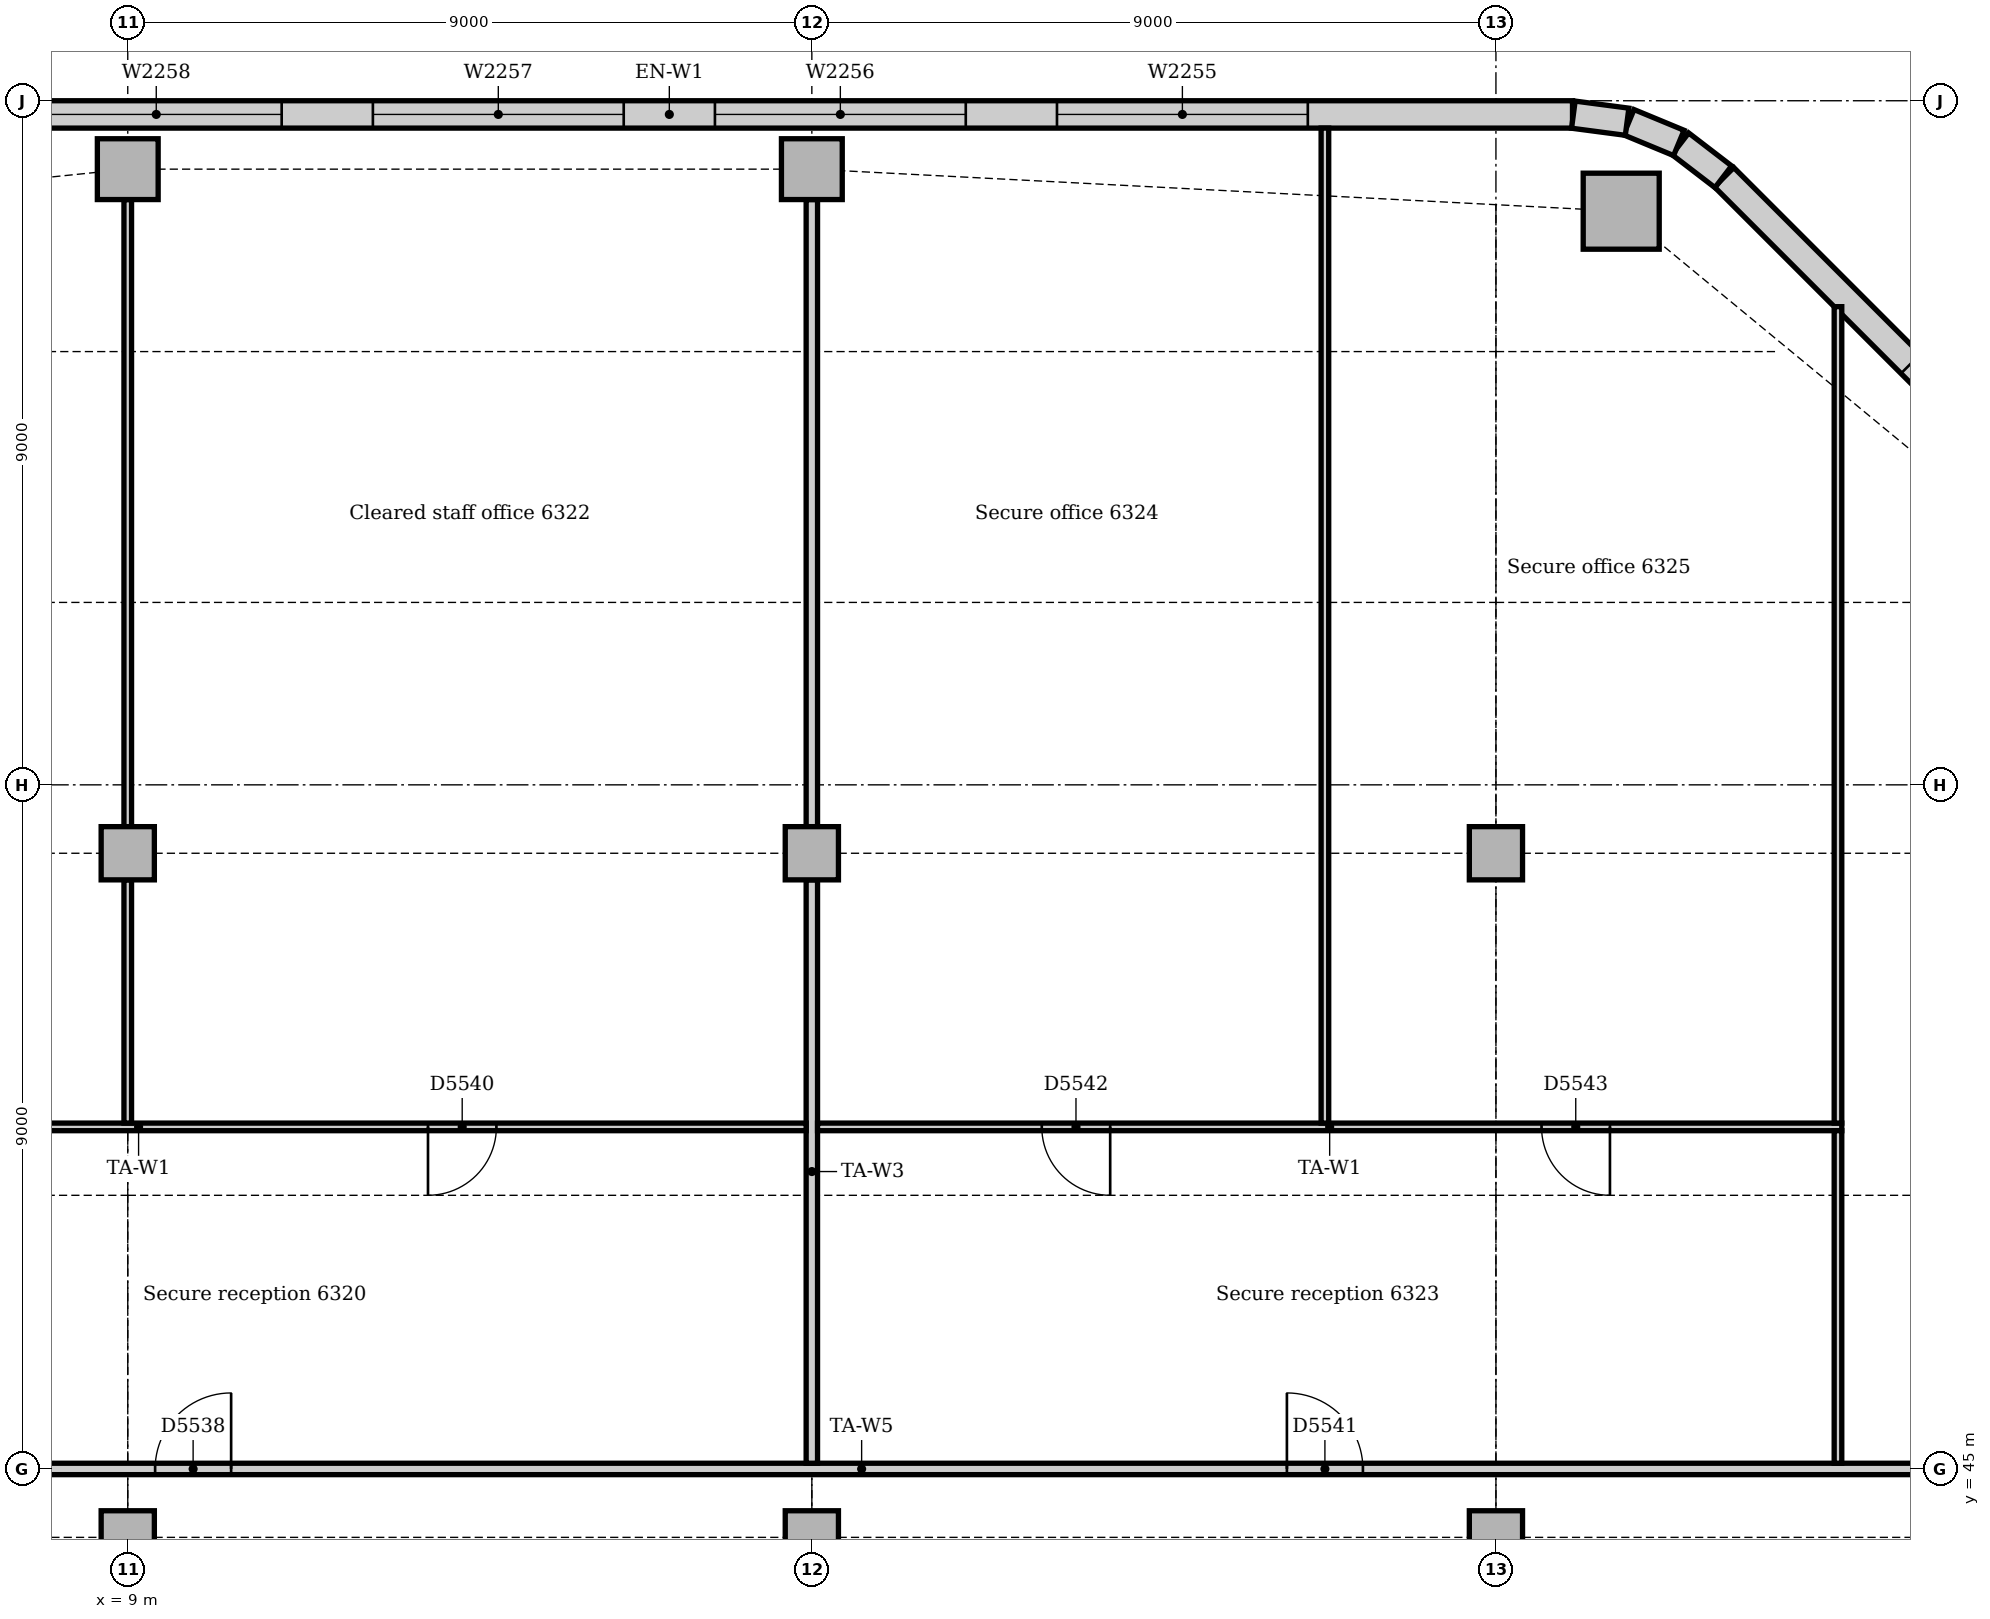
"""IFC4 building model, lengths in metres.
Left out: names, types, materials, properties, quantities, classifications, styles, units other than length and angle.
Written with IfcOpenShell. Run it as: python <this file> out.ifc"""

import sys

from ifc_helpers import new_model, si_unit, direction, frame, frame_2d, origin, origin_2d, place, context, subcontext, project, spatial, rectangle, extrude, element, fill, save


model = new_model("IFC4")
c1 = context("Model", 3, precision=1e-05, world=origin(), true_north=direction((0.0, 1.0)))
c2 = subcontext(c1, "Body", "Model", "MODEL_VIEW")
j1 = project(units=[si_unit("LENGTHUNIT", "METRE"), si_unit("PLANEANGLEUNIT", "RADIAN")], contexts=[c1])
p1 = place(None, origin())
s1 = spatial("IfcSite", under=j1, at=p1, CompositionType="ELEMENT")
p2 = place(p1, origin())
s2 = spatial("IfcBuilding", under=s1, at=p2, CompositionType="ELEMENT")
p3 = place(p2, frame((0.0, 0.0, 263.0)))
s3 = spatial("IfcBuildingStorey", under=s2, at=p3, CompositionType="ELEMENT", Elevation=263.0)
p4 = place(p3, frame((28.648, 61.547, 0.0), z_axis=(0.0, 0.0, 1.0), x_axis=(1.0, 0.0, 0.0)))
e1 = element("IfcColumn", 1, at=p4, inside=s3, PredefinedType="COLUMN", context=c2, shape_type="SweptSolid", body=[
    extrude(rectangle(XDim=1.0, YDim=1.0, at=origin_2d()), origin(), (0.0, 0.0, 1.0), 3.85),
])
for number, where, z_axis, x_axis in (
    (2, (9.0, 62.1, 0.0), (0.0, 0.0, 1.0), (1.0, 0.0, 0.0)),
    (3, (18.0, 62.1, 0.0), (0.0, 0.0, 1.0), (1.0, 0.0, 0.0)),
):
    element("IfcColumn", number, at=place(p3, frame(where, z_axis=z_axis, x_axis=x_axis)), inside=s3, PredefinedType="COLUMN", context=c2, shape_type="SweptSolid", body=[
        extrude(rectangle(XDim=0.8, YDim=0.8, at=origin_2d()), origin(), (0.0, 0.0, 1.0), 3.85),
    ])
for number, where, z_axis, x_axis in (
    (4, (9.0, 44.1, 0.0), (0.0, 0.0, 1.0), (1.0, 0.0, 0.0)),
    (5, (9.0, 53.1, 0.0), (0.0, 0.0, 1.0), (1.0, 0.0, 0.0)),
    (6, (18.0, 44.1, 0.0), (0.0, 0.0, 1.0), (1.0, 0.0, 0.0)),
    (7, (18.0, 53.1, 0.0), (0.0, 0.0, 1.0), (1.0, 0.0, 0.0)),
    (8, (27.0, 44.1, 0.0), (0.0, 0.0, 1.0), (1.0, 0.0, 0.0)),
    (9, (27.0, 53.1, 0.0), (0.0, 0.0, 1.0), (1.0, 0.0, 0.0)),
):
    element("IfcColumn", number, at=place(p3, frame(where, z_axis=z_axis, x_axis=x_axis)), inside=s3, PredefinedType="COLUMN", context=c2, shape_type="SweptSolid", body=[
        extrude(rectangle(XDim=0.7, YDim=0.7, at=origin_2d()), origin(), (0.0, 0.0, 1.0), 3.85),
    ])
p5 = place(p3, frame((37.244, 54.751, 0.0), z_axis=(0.0, 0.0, 1.0), x_axis=(-0.707106781187, 0.707106781187, 0.0)))
e10 = element("IfcWall", 10, at=p5, inside=s3, PredefinedType="STANDARD", context=c2, shape_type="SweptSolid", body=[
    extrude(rectangle(XDim=10.243, YDim=0.36, at=frame_2d((5.121, 0.0))), origin(), (0.0, 0.0, 1.0), 3.85),
])
p6 = place(p5, frame((3.471, 0.0, 0.9)))
e11 = element("IfcOpeningElement", 11, at=p6, cuts=e10, PredefinedType="OPENING", context=c2, shape_type="SweptSolid", body=[
    extrude(rectangle(XDim=3.3, YDim=1.6, at=frame_2d((1.65, 0.8))), frame((0.0, 0.19, 0.0), z_axis=(0.0, -1.0, 0.0), x_axis=(1.0, 0.0, 0.0)), (0.0, 0.0, 1.0), 0.38),
])
p7 = place(p3, frame((28.007, 62.82, 0.0), z_axis=(0.0, 0.0, 1.0), x_axis=(-1.0, 0.0, 0.0)))
e12 = element("IfcWall", 12, at=p7, inside=s3, PredefinedType="STANDARD", context=c2, shape_type="SweptSolid", body=[
    extrude(rectangle(XDim=23.765, YDim=0.36, at=frame_2d((11.882, 0.0))), origin(), (0.0, 0.0, 1.0), 3.85),
])
p8 = place(p7, frame((3.482, 0.0, 0.9)))
e13 = element("IfcOpeningElement", 13, at=p8, cuts=e12, PredefinedType="OPENING", context=c2, shape_type="SweptSolid", body=[
    extrude(rectangle(XDim=3.3, YDim=1.6, at=frame_2d((1.65, 0.8))), frame((0.0, 0.19, 0.0), z_axis=(0.0, -1.0, 0.0), x_axis=(1.0, 0.0, 0.0)), (0.0, 0.0, 1.0), 0.38),
])
p9 = place(p7, frame((7.982, 0.0, 0.9)))
e14 = element("IfcOpeningElement", 14, at=p9, cuts=e12, PredefinedType="OPENING", context=c2, shape_type="SweptSolid", body=[
    extrude(rectangle(XDim=3.3, YDim=1.6, at=frame_2d((1.65, 0.8))), frame((0.0, 0.19, 0.0), z_axis=(0.0, -1.0, 0.0), x_axis=(1.0, 0.0, 0.0)), (0.0, 0.0, 1.0), 0.38),
])
p10 = place(p7, frame((12.482, 0.0, 0.9)))
e15 = element("IfcOpeningElement", 15, at=p10, cuts=e12, PredefinedType="OPENING", context=c2, shape_type="SweptSolid", body=[
    extrude(rectangle(XDim=3.3, YDim=1.6, at=frame_2d((1.65, 0.8))), frame((0.0, 0.19, 0.0), z_axis=(0.0, -1.0, 0.0), x_axis=(1.0, 0.0, 0.0)), (0.0, 0.0, 1.0), 0.38),
])
p11 = place(p7, frame((16.982, 0.0, 0.9)))
e16 = element("IfcOpeningElement", 16, at=p11, cuts=e12, PredefinedType="OPENING", context=c2, shape_type="SweptSolid", body=[
    extrude(rectangle(XDim=3.3, YDim=1.6, at=frame_2d((1.65, 0.8))), frame((0.0, 0.19, 0.0), z_axis=(0.0, -1.0, 0.0), x_axis=(1.0, 0.0, 0.0)), (0.0, 0.0, 1.0), 0.38),
])
p12 = place(p3, frame((29.991, 62.0, 0.0), z_axis=(0.0, 0.0, 1.0), x_axis=(-0.793321924995, 0.608802368033, 0.0)))
e17 = element("IfcWall", 17, at=p12, inside=s3, PredefinedType="STANDARD", context=c2, shape_type="SweptSolid", body=[
    extrude(rectangle(XDim=0.713, YDim=0.36, at=frame_2d((0.357, 0.0))), origin(), (0.0, 0.0, 1.0), 3.85),
])
for number, where, z_axis, x_axis in (
    (18, (29.406, 62.445, 0.0), (0.0, 0.0, 1.0), (-0.924, 0.383, 0.0)),
    (19, (28.726, 62.724, 0.0), (0.0, 0.0, 1.0), (-0.991, 0.131, 0.0)),
):
    element("IfcWall", number, at=place(p3, frame(where, z_axis=z_axis, x_axis=x_axis)), inside=s3, PredefinedType="STANDARD", context=c2, shape_type="SweptSolid", body=[
        extrude(rectangle(XDim=0.713, YDim=0.36, at=frame_2d((0.356, 0.0))), origin(), (0.0, 0.0, 1.0), 3.85),
    ])
p13 = place(p3, frame((0.36, 45.0, 0.0), z_axis=(0.0, 0.0, 1.0), x_axis=(1.0, 0.0, 0.0)))
e20 = element("IfcWall", 20, at=p13, inside=s3, PredefinedType="PARTITIONING", context=c2, shape_type="SweptSolid", body=[
    extrude(rectangle(XDim=36.59, YDim=0.15, at=frame_2d((18.295, 0.0))), origin(), (0.0, 0.0, 1.0), 3.85),
])
p14 = place(p13, frame((9.0, 0.0, 0.0)))
e21 = element("IfcOpeningElement", 21, at=p14, cuts=e20, PredefinedType="OPENING", context=c2, shape_type="SweptSolid", body=[
    extrude(rectangle(XDim=1.0, YDim=2.1, at=frame_2d((0.5, 1.05))), frame((0.0, 0.085, 0.0), z_axis=(0.0, -1.0, 0.0), x_axis=(1.0, 0.0, 0.0)), (0.0, 0.0, 1.0), 0.17),
])
p15 = place(p13, frame((23.89, 0.0, 0.0)))
e22 = element("IfcOpeningElement", 22, at=p15, cuts=e20, PredefinedType="OPENING", context=c2, shape_type="SweptSolid", body=[
    extrude(rectangle(XDim=1.0, YDim=2.1, at=frame_2d((0.5, 1.05))), frame((0.0, 0.085, 0.0), z_axis=(0.0, -1.0, 0.0), x_axis=(1.0, 0.0, 0.0)), (0.0, 0.0, 1.0), 0.17),
])
p16 = place(p13, frame((33.34, 0.0, 0.0)))
e23 = element("IfcOpeningElement", 23, at=p16, cuts=e20, PredefinedType="OPENING", context=c2, shape_type="SweptSolid", body=[
    extrude(rectangle(XDim=0.9, YDim=2.1, at=frame_2d((0.45, 1.05))), frame((0.0, 0.085, 0.0), z_axis=(0.0, -1.0, 0.0), x_axis=(1.0, 0.0, 0.0)), (0.0, 0.0, 1.0), 0.17),
])
p17 = place(p3, frame((18.0, 45.075, 0.0), z_axis=(0.0, 0.0, 1.0), x_axis=(0.0, 1.0, 0.0)))
e24 = element("IfcWall", 24, at=p17, inside=s3, PredefinedType="PARTITIONING", context=c2, shape_type="SweptSolid", body=[
    extrude(rectangle(XDim=7.675, YDim=0.15, at=frame_2d((3.837, 0.0))), origin(), (0.0, 0.0, 1.0), 3.4),
])
p18 = place(p3, frame((18.0, 53.45, 0.0), z_axis=(0.0, 0.0, 1.0), x_axis=(0.0, 1.0, 0.0)))
e25 = element("IfcWall", 25, at=p18, inside=s3, PredefinedType="PARTITIONING", context=c2, shape_type="SweptSolid", body=[
    extrude(rectangle(XDim=8.25, YDim=0.15, at=frame_2d((4.125, 0.0))), origin(), (0.0, 0.0, 1.0), 3.4),
])
p19 = place(p3, frame((18.075, 49.5, 0.0), z_axis=(0.0, 0.0, 1.0), x_axis=(1.0, 0.0, 0.0)))
e26 = element("IfcWall", 26, at=p19, inside=s3, PredefinedType="PARTITIONING", context=c2, shape_type="SweptSolid", body=[
    extrude(rectangle(XDim=13.475, YDim=0.1, at=frame_2d((6.737, 0.0))), origin(), (0.0, 0.0, 1.0), 3.85),
])
p20 = place(p19, frame((2.95, 0.0, 0.0)))
e27 = element("IfcOpeningElement", 27, at=p20, cuts=e26, PredefinedType="OPENING", context=c2, shape_type="SweptSolid", body=[
    extrude(rectangle(XDim=0.9, YDim=2.1, at=frame_2d((0.45, 1.05))), frame((0.0, 0.06, 0.0), z_axis=(0.0, -1.0, 0.0), x_axis=(1.0, 0.0, 0.0)), (0.0, 0.0, 1.0), 0.12),
])
p21 = place(p19, frame((9.525, 0.0, 0.0)))
e28 = element("IfcOpeningElement", 28, at=p21, cuts=e26, PredefinedType="OPENING", context=c2, shape_type="SweptSolid", body=[
    extrude(rectangle(XDim=0.9, YDim=2.1, at=frame_2d((0.45, 1.05))), frame((0.0, 0.06, 0.0), z_axis=(0.0, -1.0, 0.0), x_axis=(1.0, 0.0, 0.0)), (0.0, 0.0, 1.0), 0.12),
])
p22 = place(p3, frame((0.36, 49.5, 0.0), z_axis=(0.0, 0.0, 1.0), x_axis=(1.0, 0.0, 0.0)))
e29 = element("IfcWall", 29, at=p22, inside=s3, PredefinedType="PARTITIONING", context=c2, shape_type="SweptSolid", body=[
    extrude(rectangle(XDim=17.565, YDim=0.1, at=frame_2d((8.783, 0.0))), origin(), (0.0, 0.0, 1.0), 3.85),
])
p23 = place(p22, frame((3.95, 0.0, 0.0)))
e30 = element("IfcOpeningElement", 30, at=p23, cuts=e29, PredefinedType="OPENING", context=c2, shape_type="SweptSolid", body=[
    extrude(rectangle(XDim=0.9, YDim=2.1, at=frame_2d((0.45, 1.05))), frame((0.0, 0.06, 0.0), z_axis=(0.0, -1.0, 0.0), x_axis=(1.0, 0.0, 0.0)), (0.0, 0.0, 1.0), 0.12),
])
p24 = place(p22, frame((12.59, 0.0, 0.0)))
e31 = element("IfcOpeningElement", 31, at=p24, cuts=e29, PredefinedType="OPENING", context=c2, shape_type="SweptSolid", body=[
    extrude(rectangle(XDim=0.9, YDim=2.1, at=frame_2d((0.45, 1.05))), frame((0.0, 0.06, 0.0), z_axis=(0.0, -1.0, 0.0), x_axis=(1.0, 0.0, 0.0)), (0.0, 0.0, 1.0), 0.12),
])
p25 = place(p3, frame((31.5, 45.075, 0.0), z_axis=(0.0, 0.0, 1.0), x_axis=(0.0, 1.0, 0.0)))
e32 = element("IfcWall", 32, at=p25, inside=s3, PredefinedType="PARTITIONING", context=c2, shape_type="SweptSolid", body=[
    extrude(rectangle(XDim=4.375, YDim=0.1, at=frame_2d((2.188, 0.0))), origin(), (0.0, 0.0, 1.0), 3.85),
])
p26 = place(p3, frame((31.5, 49.55, 0.0), z_axis=(0.0, 0.0, 1.0), x_axis=(0.0, 1.0, 0.0)))
e33 = element("IfcWall", 33, at=p26, inside=s3, PredefinedType="PARTITIONING", context=c2, shape_type="SweptSolid", body=[
    extrude(rectangle(XDim=10.741, YDim=0.1, at=frame_2d((5.37, 0.0))), origin(), (0.0, 0.0, 1.0), 3.85),
])
p27 = place(p3, frame((9.0, 49.55, 0.0), z_axis=(0.0, 0.0, 1.0), x_axis=(0.0, 1.0, 0.0)))
e34 = element("IfcWall", 34, at=p27, inside=s3, PredefinedType="PARTITIONING", context=c2, shape_type="SweptSolid", body=[
    extrude(rectangle(XDim=3.2, YDim=0.1, at=frame_2d((1.6, 0.0))), origin(), (0.0, 0.0, 1.0), 3.4),
])
p28 = place(p3, frame((9.0, 53.45, 0.0), z_axis=(0.0, 0.0, 1.0), x_axis=(0.0, 1.0, 0.0)))
e35 = element("IfcWall", 35, at=p28, inside=s3, PredefinedType="PARTITIONING", context=c2, shape_type="SweptSolid", body=[
    extrude(rectangle(XDim=8.25, YDim=0.1, at=frame_2d((4.125, 0.0))), origin(), (0.0, 0.0, 1.0), 3.4),
])
p29 = place(p3, frame((24.75, 49.55, 0.0), z_axis=(0.0, 0.0, 1.0), x_axis=(0.0, 1.0, 0.0)))
e36 = element("IfcWall", 36, at=p29, inside=s3, PredefinedType="PARTITIONING", context=c2, shape_type="SweptSolid", body=[
    extrude(rectangle(XDim=13.09, YDim=0.1, at=frame_2d((6.545, 0.0))), origin(), (0.0, 0.0, 1.0), 3.85),
])
p30 = place(p6, origin())
e37 = element("IfcWindow", 37, at=p30, inside=s3, PartitioningType="SINGLE_PANEL", PredefinedType="WINDOW", context=c2, shape_type="SweptSolid", body=[
    extrude(rectangle(XDim=3.3, YDim=1.6, at=frame_2d((1.65, 0.8))), frame((0.0, 0.13, 0.0), z_axis=(0.0, -1.0, 0.0), x_axis=(1.0, 0.0, 0.0)), (0.0, 0.0, 1.0), 0.06),
])
fill(e11, e37)
p31 = place(p8, origin())
e38 = element("IfcWindow", 38, at=p31, inside=s3, PartitioningType="SINGLE_PANEL", PredefinedType="WINDOW", context=c2, shape_type="SweptSolid", body=[
    extrude(rectangle(XDim=3.3, YDim=1.6, at=frame_2d((1.65, 0.8))), frame((0.0, 0.13, 0.0), z_axis=(0.0, -1.0, 0.0), x_axis=(1.0, 0.0, 0.0)), (0.0, 0.0, 1.0), 0.06),
])
fill(e13, e38)
p32 = place(p9, origin())
e39 = element("IfcWindow", 39, at=p32, inside=s3, PartitioningType="SINGLE_PANEL", PredefinedType="WINDOW", context=c2, shape_type="SweptSolid", body=[
    extrude(rectangle(XDim=3.3, YDim=1.6, at=frame_2d((1.65, 0.8))), frame((0.0, 0.13, 0.0), z_axis=(0.0, -1.0, 0.0), x_axis=(1.0, 0.0, 0.0)), (0.0, 0.0, 1.0), 0.06),
])
fill(e14, e39)
p33 = place(p10, origin())
e40 = element("IfcWindow", 40, at=p33, inside=s3, PartitioningType="SINGLE_PANEL", PredefinedType="WINDOW", context=c2, shape_type="SweptSolid", body=[
    extrude(rectangle(XDim=3.3, YDim=1.6, at=frame_2d((1.65, 0.8))), frame((0.0, 0.13, 0.0), z_axis=(0.0, -1.0, 0.0), x_axis=(1.0, 0.0, 0.0)), (0.0, 0.0, 1.0), 0.06),
])
fill(e15, e40)
p34 = place(p11, origin())
e41 = element("IfcWindow", 41, at=p34, inside=s3, PartitioningType="SINGLE_PANEL", PredefinedType="WINDOW", context=c2, shape_type="SweptSolid", body=[
    extrude(rectangle(XDim=3.3, YDim=1.6, at=frame_2d((1.65, 0.8))), frame((0.0, 0.13, 0.0), z_axis=(0.0, -1.0, 0.0), x_axis=(1.0, 0.0, 0.0)), (0.0, 0.0, 1.0), 0.06),
])
fill(e16, e41)
p35 = place(p14, origin())
e42 = element("IfcDoor", 42, at=p35, inside=s3, OperationType="SINGLE_SWING_RIGHT", PredefinedType="DOOR", context=c2, shape_type="SweptSolid", body=[
    extrude(rectangle(XDim=1.0, YDim=2.1, at=frame_2d((0.5, 1.05))), frame((0.0, 0.025, 0.0), z_axis=(0.0, -1.0, 0.0), x_axis=(1.0, 0.0, 0.0)), (0.0, 0.0, 1.0), 0.05),
])
fill(e21, e42)
p36 = place(p24, frame((0.9, 0.0, 0.0), z_axis=(0.0, 0.0, 1.0), x_axis=(-1.0, 0.0, 0.0)))
e43 = element("IfcDoor", 43, at=p36, inside=s3, OperationType="SINGLE_SWING_RIGHT", PredefinedType="DOOR", context=c2, shape_type="SweptSolid", body=[
    extrude(rectangle(XDim=0.9, YDim=2.1, at=frame_2d((0.45, 1.05))), frame((0.0, 0.025, 0.0), z_axis=(0.0, -1.0, 0.0), x_axis=(1.0, 0.0, 0.0)), (0.0, 0.0, 1.0), 0.05),
])
fill(e31, e43)
p37 = place(p15, origin())
e44 = element("IfcDoor", 44, at=p37, inside=s3, OperationType="SINGLE_SWING_LEFT", PredefinedType="DOOR", context=c2, shape_type="SweptSolid", body=[
    extrude(rectangle(XDim=1.0, YDim=2.1, at=frame_2d((0.5, 1.05))), frame((0.0, 0.025, 0.0), z_axis=(0.0, -1.0, 0.0), x_axis=(1.0, 0.0, 0.0)), (0.0, 0.0, 1.0), 0.05),
])
fill(e22, e44)
p38 = place(p20, frame((0.9, 0.0, 0.0), z_axis=(0.0, 0.0, 1.0), x_axis=(-1.0, 0.0, 0.0)))
e45 = element("IfcDoor", 45, at=p38, inside=s3, OperationType="SINGLE_SWING_LEFT", PredefinedType="DOOR", context=c2, shape_type="SweptSolid", body=[
    extrude(rectangle(XDim=0.9, YDim=2.1, at=frame_2d((0.45, 1.05))), frame((0.0, 0.025, 0.0), z_axis=(0.0, -1.0, 0.0), x_axis=(1.0, 0.0, 0.0)), (0.0, 0.0, 1.0), 0.05),
])
fill(e27, e45)
p39 = place(p21, frame((0.9, 0.0, 0.0), z_axis=(0.0, 0.0, 1.0), x_axis=(-1.0, 0.0, 0.0)))
e46 = element("IfcDoor", 46, at=p39, inside=s3, OperationType="SINGLE_SWING_LEFT", PredefinedType="DOOR", context=c2, shape_type="SweptSolid", body=[
    extrude(rectangle(XDim=0.9, YDim=2.1, at=frame_2d((0.45, 1.05))), frame((0.0, 0.025, 0.0), z_axis=(0.0, -1.0, 0.0), x_axis=(1.0, 0.0, 0.0)), (0.0, 0.0, 1.0), 0.05),
])
fill(e28, e46)
save(model, sys.argv[1])
